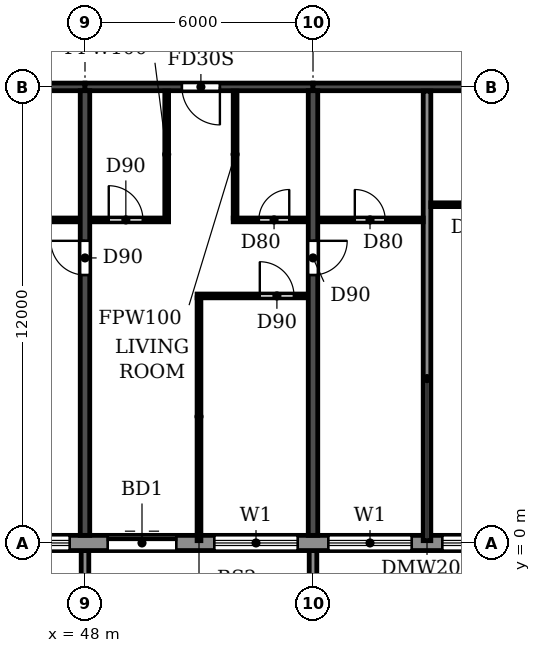
"""IFC4 building model, lengths in metres.
Left out: names, types, materials, properties, quantities, classifications, styles, units other than length and angle.
Written with IfcOpenShell. Run it as: python <this file> out.ifc"""

import sys

from ifc_helpers import new_model, si_unit, direction, frame, frame_2d, origin, place, context, subcontext, project, spatial, polyline, rectangle, outline, extrude, source, transform, mapped, element, fill, save


model = new_model("IFC4")
c1 = context("Model", 3, precision=1e-05, world=origin(), true_north=direction((0.0, 1.0)))
c2 = subcontext(c1, "Body", "Model", "MODEL_VIEW")
j1 = project(units=[si_unit("LENGTHUNIT", "METRE"), si_unit("PLANEANGLEUNIT", "RADIAN")], contexts=[c1])
p1 = place(None, origin())
s1 = spatial("IfcSite", under=j1, at=p1, CompositionType="ELEMENT")
p2 = place(p1, origin())
s2 = spatial("IfcBuilding", under=s1, at=p2, CompositionType="ELEMENT")
p3 = place(p2, frame((0.0, 0.0, 175.2)))
s3 = spatial("IfcBuildingStorey", under=s2, at=p3, CompositionType="ELEMENT", Elevation=175.2)
p4 = place(p3, frame((48.0, 0.2, 0.0), z_axis=(0.0, 0.0, 1.0), x_axis=(0.0, 1.0, 0.0)))
e1 = element("IfcWall", 1, at=p4, inside=s3, PredefinedType="SHEAR", context=c2, shape_type="SweptSolid", body=[
    extrude(rectangle(XDim=11.7, YDim=0.25, at=frame_2d((5.85, 0.0))), origin(), (0.0, 0.0, 1.0), 3.08),
])
p5 = place(p4, frame((6.85, 0.0, 0.0)))
e2 = element("IfcOpeningElement", 2, at=p5, cuts=e1, PredefinedType="OPENING", context=c2, shape_type="SweptSolid", body=[
    extrude(rectangle(XDim=0.9, YDim=2.1, at=frame_2d((0.45, 1.05))), frame((0.0, 0.135, 0.0), z_axis=(0.0, -1.0, 0.0), x_axis=(1.0, 0.0, 0.0)), (0.0, 0.0, 1.0), 0.27),
])
p6 = place(p3, frame((54.0, 0.2, 0.0), z_axis=(0.0, 0.0, 1.0), x_axis=(0.0, 1.0, 0.0)))
e3 = element("IfcWall", 3, at=p6, inside=s3, PredefinedType="SHEAR", context=c2, shape_type="SweptSolid", body=[
    extrude(rectangle(XDim=11.7, YDim=0.25, at=frame_2d((5.85, 0.0))), origin(), (0.0, 0.0, 1.0), 3.08),
])
p7 = place(p6, frame((6.85, 0.0, 0.0)))
e4 = element("IfcOpeningElement", 4, at=p7, cuts=e3, PredefinedType="OPENING", context=c2, shape_type="SweptSolid", body=[
    extrude(rectangle(XDim=0.9, YDim=2.1, at=frame_2d((0.45, 1.05))), frame((0.0, 0.135, 0.0), z_axis=(0.0, -1.0, 0.0), x_axis=(1.0, 0.0, 0.0)), (0.0, 0.0, 1.0), 0.27),
])
p8 = place(p3, frame((42.0, 12.0, 0.0), z_axis=(0.0, 0.0, 1.0), x_axis=(1.0, 0.0, 0.0)))
e5 = element("IfcWall", 5, at=p8, inside=s3, PredefinedType="SHEAR", context=c2, shape_type="SweptSolid", body=[
    extrude(rectangle(XDim=6.0, YDim=0.2, at=frame_2d((3.0, 0.0))), origin(), (0.0, 0.0, 1.0), 2.48),
])
p9 = place(p3, frame((48.0, 12.0, 0.0), z_axis=(0.0, 0.0, 1.0), x_axis=(1.0, 0.0, 0.0)))
e6 = element("IfcWall", 6, at=p9, inside=s3, PredefinedType="SHEAR", context=c2, shape_type="SweptSolid", body=[
    extrude(rectangle(XDim=6.0, YDim=0.2, at=frame_2d((3.0, 0.0))), origin(), (0.0, 0.0, 1.0), 2.48),
])
p10 = place(p9, frame((2.55, 0.0, 0.0)))
e7 = element("IfcOpeningElement", 7, at=p10, cuts=e6, PredefinedType="OPENING", context=c2, shape_type="SweptSolid", body=[
    extrude(rectangle(XDim=1.0, YDim=2.1, at=frame_2d((0.5, 1.05))), frame((0.0, 0.11, 0.0), z_axis=(0.0, -1.0, 0.0), x_axis=(1.0, 0.0, 0.0)), (0.0, 0.0, 1.0), 0.22),
])
p11 = place(p3, frame((54.0, 12.0, 0.0), z_axis=(0.0, 0.0, 1.0), x_axis=(1.0, 0.0, 0.0)))
e8 = element("IfcWall", 8, at=p11, inside=s3, PredefinedType="SHEAR", context=c2, shape_type="SweptSolid", body=[
    extrude(rectangle(XDim=6.0, YDim=0.2, at=frame_2d((3.0, 0.0))), origin(), (0.0, 0.0, 1.0), 2.48),
])
p12 = place(p3, frame((22.683, 0.0, 0.0), z_axis=(0.0, 0.0, 1.0), x_axis=(1.0, 0.0, 0.0)))
e9 = element("IfcWall", 9, at=p12, inside=s3, PredefinedType="STANDARD", context=c2, shape_type="SweptSolid", body=[
    extrude(rectangle(XDim=56.634, YDim=0.4, at=frame_2d((28.317, 0.0))), origin(), (0.0, 0.0, 1.0), 3.08),
])
p13 = place(p12, frame((1.717, 0.0, 0.9)))
e10 = element("IfcOpeningElement", 10, at=p13, cuts=e9, PredefinedType="OPENING", context=c2, shape_type="SweptSolid", body=[
    extrude(rectangle(XDim=2.2, YDim=1.5, at=frame_2d((1.1, 0.75))), frame((0.0, 0.21, 0.0), z_axis=(0.0, -1.0, 0.0), x_axis=(1.0, 0.0, 0.0)), (0.0, 0.0, 1.0), 0.42),
])
p14 = place(p12, frame((4.917, 0.0, 0.0)))
e11 = element("IfcOpeningElement", 11, at=p14, cuts=e9, PredefinedType="OPENING", context=c2, shape_type="SweptSolid", body=[
    extrude(rectangle(XDim=1.8, YDim=2.4, at=frame_2d((0.9, 1.2))), frame((0.0, 0.21, 0.0), z_axis=(0.0, -1.0, 0.0), x_axis=(1.0, 0.0, 0.0)), (0.0, 0.0, 1.0), 0.42),
])
p15 = place(p12, frame((7.717, 0.0, 0.9)))
e12 = element("IfcOpeningElement", 12, at=p15, cuts=e9, PredefinedType="OPENING", context=c2, shape_type="SweptSolid", body=[
    extrude(rectangle(XDim=2.2, YDim=1.5, at=frame_2d((1.1, 0.75))), frame((0.0, 0.21, 0.0), z_axis=(0.0, -1.0, 0.0), x_axis=(1.0, 0.0, 0.0)), (0.0, 0.0, 1.0), 0.42),
])
p16 = place(p12, frame((10.717, 0.0, 0.9)))
e13 = element("IfcOpeningElement", 13, at=p16, cuts=e9, PredefinedType="OPENING", context=c2, shape_type="SweptSolid", body=[
    extrude(rectangle(XDim=2.2, YDim=1.5, at=frame_2d((1.1, 0.75))), frame((0.0, 0.21, 0.0), z_axis=(0.0, -1.0, 0.0), x_axis=(1.0, 0.0, 0.0)), (0.0, 0.0, 1.0), 0.42),
])
p17 = place(p12, frame((13.717, 0.0, 0.9)))
e14 = element("IfcOpeningElement", 14, at=p17, cuts=e9, PredefinedType="OPENING", context=c2, shape_type="SweptSolid", body=[
    extrude(rectangle(XDim=2.2, YDim=1.5, at=frame_2d((1.1, 0.75))), frame((0.0, 0.21, 0.0), z_axis=(0.0, -1.0, 0.0), x_axis=(1.0, 0.0, 0.0)), (0.0, 0.0, 1.0), 0.42),
])
p18 = place(p12, frame((16.917, 0.0, 0.0)))
e15 = element("IfcOpeningElement", 15, at=p18, cuts=e9, PredefinedType="OPENING", context=c2, shape_type="SweptSolid", body=[
    extrude(rectangle(XDim=1.8, YDim=2.4, at=frame_2d((0.9, 1.2))), frame((0.0, 0.21, 0.0), z_axis=(0.0, -1.0, 0.0), x_axis=(1.0, 0.0, 0.0)), (0.0, 0.0, 1.0), 0.42),
])
p19 = place(p12, frame((19.717, 0.0, 0.9)))
e16 = element("IfcOpeningElement", 16, at=p19, cuts=e9, PredefinedType="OPENING", context=c2, shape_type="SweptSolid", body=[
    extrude(rectangle(XDim=2.2, YDim=1.5, at=frame_2d((1.1, 0.75))), frame((0.0, 0.21, 0.0), z_axis=(0.0, -1.0, 0.0), x_axis=(1.0, 0.0, 0.0)), (0.0, 0.0, 1.0), 0.42),
])
p20 = place(p12, frame((22.717, 0.0, 0.9)))
e17 = element("IfcOpeningElement", 17, at=p20, cuts=e9, PredefinedType="OPENING", context=c2, shape_type="SweptSolid", body=[
    extrude(rectangle(XDim=2.2, YDim=1.5, at=frame_2d((1.1, 0.75))), frame((0.0, 0.21, 0.0), z_axis=(0.0, -1.0, 0.0), x_axis=(1.0, 0.0, 0.0)), (0.0, 0.0, 1.0), 0.42),
])
p21 = place(p12, frame((25.917, 0.0, 0.0)))
e18 = element("IfcOpeningElement", 18, at=p21, cuts=e9, PredefinedType="OPENING", context=c2, shape_type="SweptSolid", body=[
    extrude(rectangle(XDim=1.8, YDim=2.4, at=frame_2d((0.9, 1.2))), frame((0.0, 0.21, 0.0), z_axis=(0.0, -1.0, 0.0), x_axis=(1.0, 0.0, 0.0)), (0.0, 0.0, 1.0), 0.42),
])
p22 = place(p12, frame((28.717, 0.0, 0.9)))
e19 = element("IfcOpeningElement", 19, at=p22, cuts=e9, PredefinedType="OPENING", context=c2, shape_type="SweptSolid", body=[
    extrude(rectangle(XDim=2.2, YDim=1.5, at=frame_2d((1.1, 0.75))), frame((0.0, 0.21, 0.0), z_axis=(0.0, -1.0, 0.0), x_axis=(1.0, 0.0, 0.0)), (0.0, 0.0, 1.0), 0.42),
])
p23 = place(p12, frame((31.717, 0.0, 0.9)))
e20 = element("IfcOpeningElement", 20, at=p23, cuts=e9, PredefinedType="OPENING", context=c2, shape_type="SweptSolid", body=[
    extrude(rectangle(XDim=2.2, YDim=1.5, at=frame_2d((1.1, 0.75))), frame((0.0, 0.21, 0.0), z_axis=(0.0, -1.0, 0.0), x_axis=(1.0, 0.0, 0.0)), (0.0, 0.0, 1.0), 0.42),
])
p24 = place(p12, frame((34.717, 0.0, 0.9)))
e21 = element("IfcOpeningElement", 21, at=p24, cuts=e9, PredefinedType="OPENING", context=c2, shape_type="SweptSolid", body=[
    extrude(rectangle(XDim=2.2, YDim=1.5, at=frame_2d((1.1, 0.75))), frame((0.0, 0.21, 0.0), z_axis=(0.0, -1.0, 0.0), x_axis=(1.0, 0.0, 0.0)), (0.0, 0.0, 1.0), 0.42),
])
p25 = place(p12, frame((37.717, 0.0, 0.9)))
e22 = element("IfcOpeningElement", 22, at=p25, cuts=e9, PredefinedType="OPENING", context=c2, shape_type="SweptSolid", body=[
    extrude(rectangle(XDim=2.2, YDim=1.5, at=frame_2d((1.1, 0.75))), frame((0.0, 0.21, 0.0), z_axis=(0.0, -1.0, 0.0), x_axis=(1.0, 0.0, 0.0)), (0.0, 0.0, 1.0), 0.42),
])
p26 = place(p12, frame((40.917, 0.0, 0.0)))
e23 = element("IfcOpeningElement", 23, at=p26, cuts=e9, PredefinedType="OPENING", context=c2, shape_type="SweptSolid", body=[
    extrude(rectangle(XDim=1.8, YDim=2.4, at=frame_2d((0.9, 1.2))), frame((0.0, 0.21, 0.0), z_axis=(0.0, -1.0, 0.0), x_axis=(1.0, 0.0, 0.0)), (0.0, 0.0, 1.0), 0.42),
])
p27 = place(p12, frame((43.717, 0.0, 0.9)))
e24 = element("IfcOpeningElement", 24, at=p27, cuts=e9, PredefinedType="OPENING", context=c2, shape_type="SweptSolid", body=[
    extrude(rectangle(XDim=2.2, YDim=1.5, at=frame_2d((1.1, 0.75))), frame((0.0, 0.21, 0.0), z_axis=(0.0, -1.0, 0.0), x_axis=(1.0, 0.0, 0.0)), (0.0, 0.0, 1.0), 0.42),
])
p28 = place(p12, frame((46.717, 0.0, 0.9)))
e25 = element("IfcOpeningElement", 25, at=p28, cuts=e9, PredefinedType="OPENING", context=c2, shape_type="SweptSolid", body=[
    extrude(rectangle(XDim=2.2, YDim=1.5, at=frame_2d((1.1, 0.75))), frame((0.0, 0.21, 0.0), z_axis=(0.0, -1.0, 0.0), x_axis=(1.0, 0.0, 0.0)), (0.0, 0.0, 1.0), 0.42),
])
p29 = place(p12, frame((49.717, 0.0, 0.9)))
e26 = element("IfcOpeningElement", 26, at=p29, cuts=e9, PredefinedType="OPENING", context=c2, shape_type="SweptSolid", body=[
    extrude(rectangle(XDim=2.2, YDim=1.5, at=frame_2d((1.1, 0.75))), frame((0.0, 0.21, 0.0), z_axis=(0.0, -1.0, 0.0), x_axis=(1.0, 0.0, 0.0)), (0.0, 0.0, 1.0), 0.42),
])
p30 = place(p12, frame((52.917, 0.0, 0.0)))
e27 = element("IfcOpeningElement", 27, at=p30, cuts=e9, PredefinedType="OPENING", context=c2, shape_type="SweptSolid", body=[
    extrude(rectangle(XDim=1.8, YDim=2.4, at=frame_2d((0.9, 1.2))), frame((0.0, 0.21, 0.0), z_axis=(0.0, -1.0, 0.0), x_axis=(1.0, 0.0, 0.0)), (0.0, 0.0, 1.0), 0.42),
])
m1 = source(origin(), c2, "Body", "SweptSolid", [
    extrude(outline(polyline([(0.0, 0.0), (0.2, 0.0), (0.2, 1.65), (0.0, 1.65), (0.0, 0.0)])), origin(), (0.0, 0.0, 1.0), 3.1),
])
for number, where in (
    (28, (47.9, -1.85, 0.0)),
    (29, (53.9, -1.85, 0.0)),
):
    element("IfcWall", number, at=place(p3, frame(where)), inside=s3, PredefinedType="STANDARD", context=c2, shape_type="MappedRepresentation", body=[
        mapped(m1, transform((0.0, 0.0, 0.0))),
    ])
p31 = place(p3, frame((57.0, 0.06, 0.0), z_axis=(0.0, 0.0, 1.0), x_axis=(0.0, 1.0, 0.0)))
e30 = element("IfcWall", 30, at=p31, inside=s3, PredefinedType="PARTITIONING", context=c2, shape_type="SweptSolid", body=[
    extrude(rectangle(XDim=11.83, YDim=0.2, at=frame_2d((5.915, 0.0))), origin(), (0.0, 0.0, 1.0), 3.08),
])
p32 = place(p3, frame((50.95, 6.5, 0.0), z_axis=(0.0, 0.0, 1.0), x_axis=(1.0, 0.0, 0.0)))
e31 = element("IfcWall", 31, at=p32, inside=s3, PredefinedType="PARTITIONING", context=c2, shape_type="SweptSolid", body=[
    extrude(rectangle(XDim=2.915, YDim=0.1, at=frame_2d((1.458, 0.0))), origin(), (0.0, 0.0, 1.0), 3.08),
])
p33 = place(p32, frame((1.65, 0.0, 0.0)))
e32 = element("IfcOpeningElement", 32, at=p33, cuts=e31, PredefinedType="OPENING", context=c2, shape_type="SweptSolid", body=[
    extrude(rectangle(XDim=0.9, YDim=2.1, at=frame_2d((0.45, 1.05))), frame((0.0, 0.06, 0.0), z_axis=(0.0, -1.0, 0.0), x_axis=(1.0, 0.0, 0.0)), (0.0, 0.0, 1.0), 0.12),
])
p34 = place(p3, frame((45.1, 8.5, 0.0), z_axis=(0.0, 0.0, 1.0), x_axis=(1.0, 0.0, 0.0)))
e33 = element("IfcWall", 33, at=p34, inside=s3, PredefinedType="PARTITIONING", context=c2, shape_type="SweptSolid", body=[
    extrude(rectangle(XDim=2.765, YDim=0.1, at=frame_2d((1.382, 0.0))), origin(), (0.0, 0.0, 1.0), 3.08),
])
p35 = place(p34, frame((1.0, 0.0, 0.0)))
e34 = element("IfcOpeningElement", 34, at=p35, cuts=e33, PredefinedType="OPENING", context=c2, shape_type="SweptSolid", body=[
    extrude(rectangle(XDim=0.8, YDim=2.1, at=frame_2d((0.4, 1.05))), frame((0.0, 0.06, 0.0), z_axis=(0.0, -1.0, 0.0), x_axis=(1.0, 0.0, 0.0)), (0.0, 0.0, 1.0), 0.12),
])
p36 = place(p3, frame((48.135, 8.5, 0.0), z_axis=(0.0, 0.0, 1.0), x_axis=(1.0, 0.0, 0.0)))
e35 = element("IfcWall", 35, at=p36, inside=s3, PredefinedType="PARTITIONING", context=c2, shape_type="SweptSolid", body=[
    extrude(rectangle(XDim=2.065, YDim=0.1, at=frame_2d((1.032, 0.0))), origin(), (0.0, 0.0, 1.0), 3.08),
])
p37 = place(p36, frame((0.49, 0.0, 0.0)))
e36 = element("IfcOpeningElement", 36, at=p37, cuts=e35, PredefinedType="OPENING", context=c2, shape_type="SweptSolid", body=[
    extrude(rectangle(XDim=0.9, YDim=2.1, at=frame_2d((0.45, 1.05))), frame((0.0, 0.06, 0.0), z_axis=(0.0, -1.0, 0.0), x_axis=(1.0, 0.0, 0.0)), (0.0, 0.0, 1.0), 0.12),
])
p38 = place(p3, frame((51.9, 8.5, 0.0), z_axis=(0.0, 0.0, 1.0), x_axis=(1.0, 0.0, 0.0)))
e37 = element("IfcWall", 37, at=p38, inside=s3, PredefinedType="PARTITIONING", context=c2, shape_type="SweptSolid", body=[
    extrude(rectangle(XDim=1.965, YDim=0.1, at=frame_2d((0.982, 0.0))), origin(), (0.0, 0.0, 1.0), 3.08),
])
p39 = place(p38, frame((0.675, 0.0, 0.0)))
e38 = element("IfcOpeningElement", 38, at=p39, cuts=e37, PredefinedType="OPENING", context=c2, shape_type="SweptSolid", body=[
    extrude(rectangle(XDim=0.8, YDim=2.1, at=frame_2d((0.4, 1.05))), frame((0.0, 0.06, 0.0), z_axis=(0.0, -1.0, 0.0), x_axis=(1.0, 0.0, 0.0)), (0.0, 0.0, 1.0), 0.12),
])
p40 = place(p3, frame((54.135, 8.5, 0.0), z_axis=(0.0, 0.0, 1.0), x_axis=(1.0, 0.0, 0.0)))
e39 = element("IfcWall", 39, at=p40, inside=s3, PredefinedType="PARTITIONING", context=c2, shape_type="SweptSolid", body=[
    extrude(rectangle(XDim=2.765, YDim=0.1, at=frame_2d((1.382, 0.0))), origin(), (0.0, 0.0, 1.0), 3.08),
])
p41 = place(p40, frame((0.965, 0.0, 0.0)))
e40 = element("IfcOpeningElement", 40, at=p41, cuts=e39, PredefinedType="OPENING", context=c2, shape_type="SweptSolid", body=[
    extrude(rectangle(XDim=0.8, YDim=2.1, at=frame_2d((0.4, 1.05))), frame((0.0, 0.06, 0.0), z_axis=(0.0, -1.0, 0.0), x_axis=(1.0, 0.0, 0.0)), (0.0, 0.0, 1.0), 0.12),
])
p42 = place(p3, frame((57.1, 8.9, 0.0), z_axis=(0.0, 0.0, 1.0), x_axis=(1.0, 0.0, 0.0)))
e41 = element("IfcWall", 41, at=p42, inside=s3, PredefinedType="PARTITIONING", context=c2, shape_type="SweptSolid", body=[
    extrude(rectangle(XDim=2.765, YDim=0.1, at=frame_2d((1.382, 0.0))), origin(), (0.0, 0.0, 1.0), 3.08),
])
p43 = place(p42, frame((1.0, 0.0, 0.0)))
e42 = element("IfcOpeningElement", 42, at=p43, cuts=e41, PredefinedType="OPENING", context=c2, shape_type="SweptSolid", body=[
    extrude(rectangle(XDim=0.8, YDim=2.1, at=frame_2d((0.4, 1.05))), frame((0.0, 0.06, 0.0), z_axis=(0.0, -1.0, 0.0), x_axis=(1.0, 0.0, 0.0)), (0.0, 0.0, 1.0), 0.12),
])
p44 = place(p3, frame((50.15, 8.55, 0.0), z_axis=(0.0, 0.0, 1.0), x_axis=(0.0, 1.0, 0.0)))
e43 = element("IfcWall", 43, at=p44, inside=s3, PredefinedType="PARTITIONING", context=c2, shape_type="SweptSolid", body=[
    extrude(rectangle(XDim=3.34, YDim=0.1, at=frame_2d((1.67, 0.0))), origin(), (0.0, 0.0, 1.0), 3.08),
])
p45 = place(p3, frame((51.0, 0.06, 0.0), z_axis=(0.0, 0.0, 1.0), x_axis=(0.0, 1.0, 0.0)))
e44 = element("IfcWall", 44, at=p45, inside=s3, PredefinedType="PARTITIONING", context=c2, shape_type="SweptSolid", body=[
    extrude(rectangle(XDim=6.39, YDim=0.1, at=frame_2d((3.195, 0.0))), origin(), (0.0, 0.0, 1.0), 3.08),
])
p46 = place(p3, frame((51.95, 8.55, 0.0), z_axis=(0.0, 0.0, 1.0), x_axis=(0.0, 1.0, 0.0)))
e45 = element("IfcWall", 45, at=p46, inside=s3, PredefinedType="PARTITIONING", context=c2, shape_type="SweptSolid", body=[
    extrude(rectangle(XDim=3.34, YDim=0.1, at=frame_2d((1.67, 0.0))), origin(), (0.0, 0.0, 1.0), 3.08),
])
p47 = place(p20, origin())
e46 = element("IfcWindow", 46, at=p47, inside=s3, PartitioningType="DOUBLE_PANEL_HORIZONTAL", PredefinedType="WINDOW", context=c2, shape_type="SweptSolid", body=[
    extrude(rectangle(XDim=2.2, YDim=1.5, at=frame_2d((1.1, 0.75))), frame((0.0, 0.03, 0.0), z_axis=(0.0, -1.0, 0.0), x_axis=(1.0, 0.0, 0.0)), (0.0, 0.0, 1.0), 0.06),
])
fill(e17, e46)
p48 = place(p21, origin())
e47 = element("IfcDoor", 47, at=p48, inside=s3, OperationType="DOUBLE_DOOR_SLIDING", PredefinedType="DOOR", context=c2, shape_type="SweptSolid", body=[
    extrude(rectangle(XDim=1.8, YDim=2.4, at=frame_2d((0.9, 1.2))), frame((0.0, 0.025, 0.0), z_axis=(0.0, -1.0, 0.0), x_axis=(1.0, 0.0, 0.0)), (0.0, 0.0, 1.0), 0.05),
])
fill(e18, e47)
p49 = place(p22, origin())
e48 = element("IfcWindow", 48, at=p49, inside=s3, PartitioningType="DOUBLE_PANEL_HORIZONTAL", PredefinedType="WINDOW", context=c2, shape_type="SweptSolid", body=[
    extrude(rectangle(XDim=2.2, YDim=1.5, at=frame_2d((1.1, 0.75))), frame((0.0, 0.03, 0.0), z_axis=(0.0, -1.0, 0.0), x_axis=(1.0, 0.0, 0.0)), (0.0, 0.0, 1.0), 0.06),
])
fill(e19, e48)
p50 = place(p23, origin())
e49 = element("IfcWindow", 49, at=p50, inside=s3, PartitioningType="DOUBLE_PANEL_HORIZONTAL", PredefinedType="WINDOW", context=c2, shape_type="SweptSolid", body=[
    extrude(rectangle(XDim=2.2, YDim=1.5, at=frame_2d((1.1, 0.75))), frame((0.0, 0.03, 0.0), z_axis=(0.0, -1.0, 0.0), x_axis=(1.0, 0.0, 0.0)), (0.0, 0.0, 1.0), 0.06),
])
fill(e20, e49)
p51 = place(p24, origin())
e50 = element("IfcWindow", 50, at=p51, inside=s3, PartitioningType="DOUBLE_PANEL_HORIZONTAL", PredefinedType="WINDOW", context=c2, shape_type="SweptSolid", body=[
    extrude(rectangle(XDim=2.2, YDim=1.5, at=frame_2d((1.1, 0.75))), frame((0.0, 0.03, 0.0), z_axis=(0.0, -1.0, 0.0), x_axis=(1.0, 0.0, 0.0)), (0.0, 0.0, 1.0), 0.06),
])
fill(e21, e50)
p52 = place(p41, origin())
e51 = element("IfcDoor", 51, at=p52, inside=s3, OperationType="SINGLE_SWING_LEFT", PredefinedType="DOOR", context=c2, shape_type="SweptSolid", body=[
    extrude(rectangle(XDim=0.8, YDim=2.1, at=frame_2d((0.4, 1.05))), frame((0.0, 0.025, 0.0), z_axis=(0.0, -1.0, 0.0), x_axis=(1.0, 0.0, 0.0)), (0.0, 0.0, 1.0), 0.05),
])
fill(e40, e51)
p53 = place(p5, origin())
e52 = element("IfcDoor", 52, at=p53, inside=s3, OperationType="SINGLE_SWING_RIGHT", PredefinedType="DOOR", context=c2, shape_type="SweptSolid", body=[
    extrude(rectangle(XDim=0.9, YDim=2.1, at=frame_2d((0.45, 1.05))), frame((0.0, 0.025, 0.0), z_axis=(0.0, -1.0, 0.0), x_axis=(1.0, 0.0, 0.0)), (0.0, 0.0, 1.0), 0.05),
])
fill(e2, e52)
p54 = place(p37, origin())
e53 = element("IfcDoor", 53, at=p54, inside=s3, OperationType="SINGLE_SWING_LEFT", PredefinedType="DOOR", context=c2, shape_type="SweptSolid", body=[
    extrude(rectangle(XDim=0.9, YDim=2.1, at=frame_2d((0.45, 1.05))), frame((0.0, 0.025, 0.0), z_axis=(0.0, -1.0, 0.0), x_axis=(1.0, 0.0, 0.0)), (0.0, 0.0, 1.0), 0.05),
])
fill(e36, e53)
p55 = place(p10, frame((1.0, 0.0, 0.0), z_axis=(0.0, 0.0, 1.0), x_axis=(-1.0, 0.0, 0.0)))
e54 = element("IfcDoor", 54, at=p55, inside=s3, OperationType="SINGLE_SWING_LEFT", PredefinedType="DOOR", context=c2, shape_type="SweptSolid", body=[
    extrude(rectangle(XDim=1.0, YDim=2.1, at=frame_2d((0.5, 1.05))), frame((0.0, 0.025, 0.0), z_axis=(0.0, -1.0, 0.0), x_axis=(1.0, 0.0, 0.0)), (0.0, 0.0, 1.0), 0.05),
])
fill(e7, e54)
p56 = place(p39, origin())
e55 = element("IfcDoor", 55, at=p56, inside=s3, OperationType="SINGLE_SWING_RIGHT", PredefinedType="DOOR", context=c2, shape_type="SweptSolid", body=[
    extrude(rectangle(XDim=0.8, YDim=2.1, at=frame_2d((0.4, 1.05))), frame((0.0, 0.025, 0.0), z_axis=(0.0, -1.0, 0.0), x_axis=(1.0, 0.0, 0.0)), (0.0, 0.0, 1.0), 0.05),
])
fill(e38, e55)
p57 = place(p33, origin())
e56 = element("IfcDoor", 56, at=p57, inside=s3, OperationType="SINGLE_SWING_LEFT", PredefinedType="DOOR", context=c2, shape_type="SweptSolid", body=[
    extrude(rectangle(XDim=0.9, YDim=2.1, at=frame_2d((0.45, 1.05))), frame((0.0, 0.025, 0.0), z_axis=(0.0, -1.0, 0.0), x_axis=(1.0, 0.0, 0.0)), (0.0, 0.0, 1.0), 0.05),
])
fill(e32, e56)
p58 = place(p7, frame((0.9, 0.0, 0.0), z_axis=(0.0, 0.0, 1.0), x_axis=(-1.0, 0.0, 0.0)))
e57 = element("IfcDoor", 57, at=p58, inside=s3, OperationType="SINGLE_SWING_LEFT", PredefinedType="DOOR", context=c2, shape_type="SweptSolid", body=[
    extrude(rectangle(XDim=0.9, YDim=2.1, at=frame_2d((0.45, 1.05))), frame((0.0, 0.025, 0.0), z_axis=(0.0, -1.0, 0.0), x_axis=(1.0, 0.0, 0.0)), (0.0, 0.0, 1.0), 0.05),
])
fill(e4, e57)
save(model, sys.argv[1])
